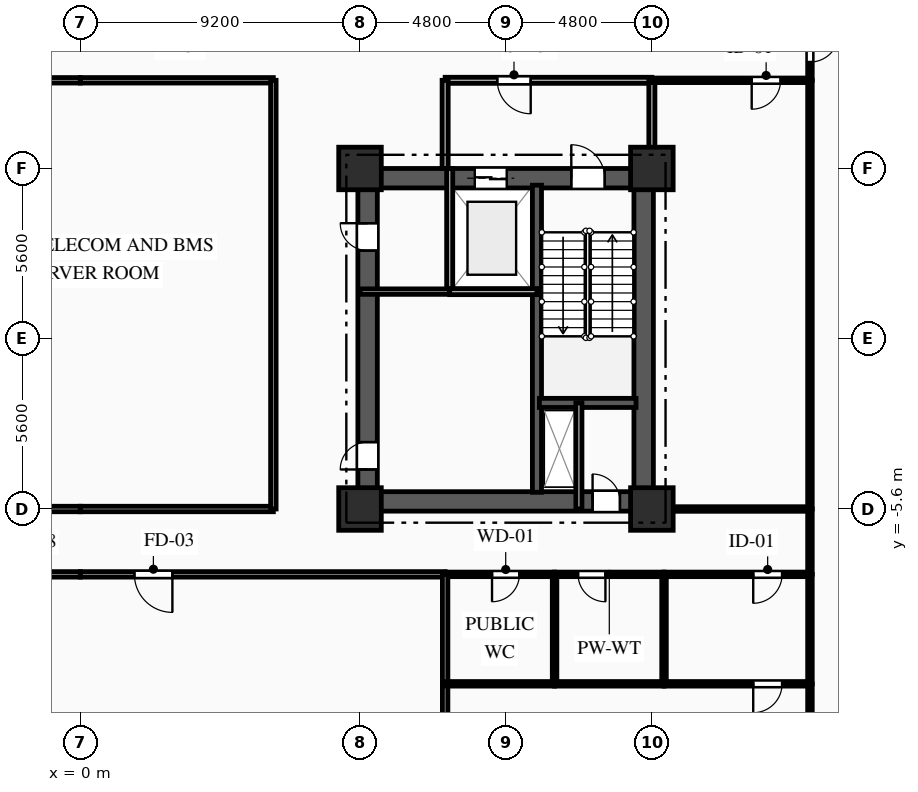
"""IFC4 building model, lengths in metres.
Left out: names, types, materials, properties, quantities, classifications, styles, units other than length and angle.
Written with IfcOpenShell. Run it as: python <this file> out.ifc"""

import sys

from ifc_helpers import new_model, si_unit, direction, frame, frame_2d, origin, origin_2d, place, context, subcontext, project, spatial, rectangle, extrude, element, fill, save


model = new_model("IFC4")
c1 = context("Model", 3, precision=1e-05, world=origin(), true_north=direction((0.0, 1.0)))
c2 = subcontext(c1, "Body", "Model", "MODEL_VIEW")
j1 = project(units=[si_unit("LENGTHUNIT", "METRE"), si_unit("PLANEANGLEUNIT", "RADIAN")], contexts=[c1])
p1 = place(None, origin())
s1 = spatial("IfcSite", under=j1, at=p1, CompositionType="ELEMENT")
p2 = place(p1, origin())
s2 = spatial("IfcBuilding", under=s1, at=p2, CompositionType="ELEMENT")
p3 = place(p2, frame((0.0, 0.0, -4.5)))
s3 = spatial("IfcBuildingStorey", under=s2, at=p3, CompositionType="ELEMENT", Elevation=-4.5)
for number, where, z_axis, x_axis in (
    (1, (9.2, -5.6, 0.0), (0.0, 0.0, 1.0), (1.0, 0.0, 0.0)),
    (2, (9.2, 5.6, 0.0), (0.0, 0.0, 1.0), (1.0, 0.0, 0.0)),
    (3, (18.8, -5.6, 0.0), (0.0, 0.0, 1.0), (1.0, 0.0, 0.0)),
    (4, (18.8, 5.6, 0.0), (0.0, 0.0, 1.0), (1.0, 0.0, 0.0)),
):
    element("IfcColumn", number, at=place(p3, frame(where, z_axis=z_axis, x_axis=x_axis)), inside=s3, PredefinedType="COLUMN", context=c2, shape_type="SweptSolid", body=[
        extrude(rectangle(XDim=1.4, YDim=1.4, at=origin_2d()), origin(), (0.0, 0.0, 1.0), 4.5),
    ])
p4 = place(p3, frame((9.2, 5.28, 0.0), z_axis=(0.0, 0.0, 1.0), x_axis=(1.0, 0.0, 0.0)))
e5 = element("IfcWall", 5, at=p4, inside=s3, PredefinedType="SHEAR", context=c2, shape_type="SweptSolid", body=[
    extrude(rectangle(XDim=9.6, YDim=0.64, at=frame_2d((4.8, 0.0))), origin(), (0.0, 0.0, 1.0), 4.16),
])
p5 = place(p4, frame((6.95, 0.0, 0.0)))
e6 = element("IfcOpeningElement", 6, at=p5, cuts=e5, PredefinedType="OPENING", context=c2, shape_type="SweptSolid", body=[
    extrude(rectangle(XDim=1.1, YDim=2.15, at=frame_2d((0.55, 1.075))), frame((0.0, 0.33, 0.0), z_axis=(0.0, -1.0, 0.0), x_axis=(1.0, 0.0, 0.0)), (0.0, 0.0, 1.0), 0.66),
])
p6 = place(p4, frame((3.775, 0.0, 0.0)))
e7 = element("IfcOpeningElement", 7, at=p6, cuts=e5, PredefinedType="OPENING", context=c2, shape_type="SweptSolid", body=[
    extrude(rectangle(XDim=1.05, YDim=2.1, at=frame_2d((0.525, 1.05))), frame((0.0, 0.33, 0.0), z_axis=(0.0, -1.0, 0.0), x_axis=(1.0, 0.0, 0.0)), (0.0, 0.0, 1.0), 0.66),
])
p7 = place(p3, frame((9.2, -5.35, 0.0), z_axis=(0.0, 0.0, 1.0), x_axis=(1.0, 0.0, 0.0)))
e8 = element("IfcWall", 8, at=p7, inside=s3, PredefinedType="SHEAR", context=c2, shape_type="SweptSolid", body=[
    extrude(rectangle(XDim=9.6, YDim=0.64, at=frame_2d((4.8, 0.0))), origin(), (0.0, 0.0, 1.0), 4.16),
])
p8 = place(p7, frame((7.65, 0.0, 0.0)))
e9 = element("IfcOpeningElement", 9, at=p8, cuts=e8, PredefinedType="OPENING", context=c2, shape_type="SweptSolid", body=[
    extrude(rectangle(XDim=0.9, YDim=2.1, at=frame_2d((0.45, 1.05))), frame((0.0, 0.33, 0.0), z_axis=(0.0, -1.0, 0.0), x_axis=(1.0, 0.0, 0.0)), (0.0, 0.0, 1.0), 0.66),
])
p9 = place(p3, frame((9.45, -5.05, 0.0), z_axis=(0.0, 0.0, 1.0), x_axis=(0.0, 1.0, 0.0)))
e10 = element("IfcWall", 10, at=p9, inside=s3, PredefinedType="SHEAR", context=c2, shape_type="SweptSolid", body=[
    extrude(rectangle(XDim=10.1, YDim=0.64, at=frame_2d((5.05, 0.0))), origin(), (0.0, 0.0, 1.0), 4.16),
])
p10 = place(p9, frame((7.95, 0.0, 0.0)))
e11 = element("IfcOpeningElement", 11, at=p10, cuts=e10, PredefinedType="OPENING", context=c2, shape_type="SweptSolid", body=[
    extrude(rectangle(XDim=0.9, YDim=2.1, at=frame_2d((0.45, 1.05))), frame((0.0, 0.33, 0.0), z_axis=(0.0, -1.0, 0.0), x_axis=(1.0, 0.0, 0.0)), (0.0, 0.0, 1.0), 0.66),
])
p11 = place(p9, frame((0.75, 0.0, 0.0)))
e12 = element("IfcOpeningElement", 12, at=p11, cuts=e10, PredefinedType="OPENING", context=c2, shape_type="SweptSolid", body=[
    extrude(rectangle(XDim=0.9, YDim=2.1, at=frame_2d((0.45, 1.05))), frame((0.0, 0.33, 0.0), z_axis=(0.0, -1.0, 0.0), x_axis=(1.0, 0.0, 0.0)), (0.0, 0.0, 1.0), 0.66),
])
p12 = place(p3, frame((18.53, -5.05, 0.0), z_axis=(0.0, 0.0, 1.0), x_axis=(0.0, 1.0, 0.0)))
e13 = element("IfcWall", 13, at=p12, inside=s3, PredefinedType="SHEAR", context=c2, shape_type="SweptSolid", body=[
    extrude(rectangle(XDim=10.1, YDim=0.64, at=frame_2d((5.05, 0.0))), origin(), (0.0, 0.0, 1.0), 4.16),
])
p13 = place(p3, frame((15.02, -5.05, 0.0), z_axis=(0.0, 0.0, 1.0), x_axis=(0.0, 1.0, 0.0)))
e14 = element("IfcWall", 14, at=p13, inside=s3, PredefinedType="SHEAR", context=c2, shape_type="SweptSolid", body=[
    extrude(rectangle(XDim=10.1, YDim=0.3, at=frame_2d((5.05, 0.0))), origin(), (0.0, 0.0, 1.0), 4.16),
])
p14 = place(p3, frame((15.1, -2.11, 0.0), z_axis=(0.0, 0.0, 1.0), x_axis=(1.0, 0.0, 0.0)))
e15 = element("IfcWall", 15, at=p14, inside=s3, PredefinedType="SHEAR", context=c2, shape_type="SweptSolid", body=[
    extrude(rectangle(XDim=3.18, YDim=0.3, at=frame_2d((1.59, 0.0))), origin(), (0.0, 0.0, 1.0), 4.16),
])
p15 = place(p3, frame((16.4, -2.11, 0.0), z_axis=(0.0, 0.0, 1.0), x_axis=(0.0, -1.0, 0.0)))
e16 = element("IfcWall", 16, at=p15, inside=s3, PredefinedType="PARTITIONING", context=c2, shape_type="SweptSolid", body=[
    extrude(rectangle(XDim=3.49, YDim=0.2, at=frame_2d((1.745, 0.0))), origin(), (0.0, 0.0, 1.0), 4.16),
])
p16 = place(p3, frame((12.15, 5.6, 0.0), z_axis=(0.0, 0.0, 1.0), x_axis=(0.0, -1.0, 0.0)))
e17 = element("IfcWall", 17, at=p16, inside=s3, PredefinedType="PARTITIONING", context=c2, shape_type="SweptSolid", body=[
    extrude(rectangle(XDim=4.05, YDim=0.2, at=frame_2d((2.025, 0.0))), origin(), (0.0, 0.0, 1.0), 4.16),
])
p17 = place(p3, frame((18.8, 8.5, 0.0), z_axis=(0.0, 0.0, 1.0), x_axis=(-1.0, 0.0, 0.0)))
e18 = element("IfcWall", 18, at=p17, inside=s3, PredefinedType="PARTITIONING", context=c2, shape_type="SweptSolid", body=[
    extrude(rectangle(XDim=6.8, YDim=0.2, at=frame_2d((3.4, 0.0))), origin(), (0.0, 0.0, 1.0), 4.16),
])
p18 = place(p17, frame((3.985, 0.0, 0.0)))
e19 = element("IfcOpeningElement", 19, at=p18, cuts=e18, PredefinedType="OPENING", context=c2, shape_type="SweptSolid", body=[
    extrude(rectangle(XDim=1.1, YDim=2.15, at=frame_2d((0.55, 1.075))), frame((0.0, 0.11, 0.0), z_axis=(0.0, -1.0, 0.0), x_axis=(1.0, 0.0, 0.0)), (0.0, 0.0, 1.0), 0.22),
])
p19 = place(p3, frame((12.0, 8.5, 0.0), z_axis=(0.0, 0.0, 1.0), x_axis=(0.0, -1.0, 0.0)))
e20 = element("IfcWall", 20, at=p19, inside=s3, PredefinedType="PARTITIONING", context=c2, shape_type="SweptSolid", body=[
    extrude(rectangle(XDim=2.9, YDim=0.2, at=frame_2d((1.45, 0.0))), origin(), (0.0, 0.0, 1.0), 4.16),
])
p20 = place(p3, frame((18.8, 5.6, 0.0), z_axis=(0.0, 0.0, 1.0), x_axis=(0.0, 1.0, 0.0)))
e21 = element("IfcWall", 21, at=p20, inside=s3, PredefinedType="PARTITIONING", context=c2, shape_type="SweptSolid", body=[
    extrude(rectangle(XDim=2.9, YDim=0.2, at=frame_2d((1.45, 0.0))), origin(), (0.0, 0.0, 1.0), 3.645),
])
p21 = place(p3, frame((9.2, 1.55, 0.0), z_axis=(0.0, 0.0, 1.0), x_axis=(1.0, 0.0, 0.0)))
e22 = element("IfcWall", 22, at=p21, inside=s3, PredefinedType="PARTITIONING", context=c2, shape_type="SweptSolid", body=[
    extrude(rectangle(XDim=2.95, YDim=0.18, at=frame_2d((1.475, 0.0))), origin(), (0.0, 0.0, 1.0), 4.16),
])
p22 = place(p3, frame((0.0, 8.5, 0.0), z_axis=(0.0, 0.0, 1.0), x_axis=(-1.0, 0.0, 0.0)))
e23 = element("IfcWall", 23, at=p22, inside=s3, PredefinedType="PARTITIONING", context=c2, shape_type="SweptSolid", body=[
    extrude(rectangle(XDim=6.35, YDim=0.18, at=frame_2d((3.175, 0.0))), origin(), (0.0, 0.0, 1.0), 4.16),
])
p23 = place(p3, frame((24.0, 8.5, 0.0), z_axis=(0.0, 0.0, 1.0), x_axis=(-1.0, 0.0, 0.0)))
e24 = element("IfcWall", 24, at=p23, inside=s3, PredefinedType="PARTITIONING", context=c2, shape_type="SweptSolid", body=[
    extrude(rectangle(XDim=5.2, YDim=0.15, at=frame_2d((2.6, 0.0))), origin(), (0.0, 0.0, 1.0), 4.16),
])
p24 = place(p23, frame((0.966, 0.0, 0.0)))
e25 = element("IfcOpeningElement", 25, at=p24, cuts=e24, PredefinedType="OPENING", context=c2, shape_type="SweptSolid", body=[
    extrude(rectangle(XDim=0.95, YDim=2.1, at=frame_2d((0.475, 1.05))), frame((0.0, 0.085, 0.0), z_axis=(0.0, -1.0, 0.0), x_axis=(1.0, 0.0, 0.0)), (0.0, 0.0, 1.0), 0.17),
])
p25 = place(p3, frame((6.35, 8.5, 0.0), z_axis=(0.0, 0.0, 1.0), x_axis=(-1.0, 0.0, 0.0)))
e26 = element("IfcWall", 26, at=p25, inside=s3, PredefinedType="PARTITIONING", context=c2, shape_type="SweptSolid", body=[
    extrude(rectangle(XDim=6.35, YDim=0.18, at=frame_2d((3.175, 0.0))), origin(), (0.0, 0.0, 1.0), 4.16),
])
p26 = place(p3, frame((24.0, 10.65, 0.0), z_axis=(0.0, 0.0, 1.0), x_axis=(0.0, -1.0, 0.0)))
e27 = element("IfcWall", 27, at=p26, inside=s3, PredefinedType="PARTITIONING", context=c2, shape_type="SweptSolid", body=[
    extrude(rectangle(XDim=2.15, YDim=0.15, at=frame_2d((1.075, 0.0))), origin(), (0.0, 0.0, 1.0), 4.16),
])
p27 = place(p26, frame((0.6, 0.0, 0.0)))
e28 = element("IfcOpeningElement", 28, at=p27, cuts=e27, PredefinedType="OPENING", context=c2, shape_type="SweptSolid", body=[
    extrude(rectangle(XDim=0.95, YDim=2.1, at=frame_2d((0.475, 1.05))), frame((0.0, 0.085, 0.0), z_axis=(0.0, -1.0, 0.0), x_axis=(1.0, 0.0, 0.0)), (0.0, 0.0, 1.0), 0.17),
])
p28 = place(p3, frame((0.0, -7.75, 0.0), z_axis=(0.0, 0.0, 1.0), x_axis=(-1.0, 0.0, 0.0)))
e29 = element("IfcWall", 29, at=p28, inside=s3, PredefinedType="PARTITIONING", context=c2, shape_type="SweptSolid", body=[
    extrude(rectangle(XDim=3.36, YDim=0.18, at=frame_2d((1.68, 0.0))), origin(), (0.0, 0.0, 1.0), 4.16),
])
p29 = place(p3, frame((-6.35, -5.6, 0.0), z_axis=(0.0, 0.0, 1.0), x_axis=(1.0, 0.0, 0.0)))
e30 = element("IfcWall", 30, at=p29, inside=s3, PredefinedType="PARTITIONING", context=c2, shape_type="SweptSolid", body=[
    extrude(rectangle(XDim=6.35, YDim=0.18, at=frame_2d((3.175, 0.0))), origin(), (0.0, 0.0, 1.0), 3.331),
])
p30 = place(p3, frame((12.0, -7.75, 0.0), z_axis=(0.0, 0.0, 1.0), x_axis=(-1.0, 0.0, 0.0)))
e31 = element("IfcWall", 31, at=p30, inside=s3, PredefinedType="PARTITIONING", context=c2, shape_type="SweptSolid", body=[
    extrude(rectangle(XDim=12.0, YDim=0.18, at=frame_2d((6.0, 0.0))), origin(), (0.0, 0.0, 1.0), 4.16),
])
p31 = place(p30, frame((8.971, 0.0, 0.0)))
e32 = element("IfcOpeningElement", 32, at=p31, cuts=e31, PredefinedType="OPENING", context=c2, shape_type="SweptSolid", body=[
    extrude(rectangle(XDim=1.25, YDim=2.2, at=frame_2d((0.625, 1.1))), frame((0.0, 0.1, 0.0), z_axis=(0.0, -1.0, 0.0), x_axis=(1.0, 0.0, 0.0)), (0.0, 0.0, 1.0), 0.2),
])
p32 = place(p3, frame((18.8, -5.6, 0.0), z_axis=(0.0, 0.0, 1.0), x_axis=(1.0, 0.0, 0.0)))
e33 = element("IfcWall", 33, at=p32, inside=s3, PredefinedType="PARTITIONING", context=c2, shape_type="SweptSolid", body=[
    extrude(rectangle(XDim=5.2, YDim=0.15, at=frame_2d((2.6, 0.0))), origin(), (0.0, 0.0, 1.0), 4.16),
])
p33 = place(p3, frame((0.0, -5.6, 0.0), z_axis=(0.0, 0.0, 1.0), x_axis=(1.0, 0.0, 0.0)))
e34 = element("IfcWall", 34, at=p33, inside=s3, PredefinedType="PARTITIONING", context=c2, shape_type="SweptSolid", body=[
    extrude(rectangle(XDim=6.35, YDim=0.18, at=frame_2d((3.175, 0.0))), origin(), (0.0, 0.0, 1.0), 3.331),
])
p34 = place(p3, frame((24.0, -5.6, 0.0), z_axis=(0.0, 0.0, 1.0), x_axis=(0.0, -1.0, 0.0)))
e35 = element("IfcWall", 35, at=p34, inside=s3, PredefinedType="PARTITIONING", context=c2, shape_type="SweptSolid", body=[
    extrude(rectangle(XDim=2.15, YDim=0.15, at=frame_2d((1.075, 0.0))), origin(), (0.0, 0.0, 1.0), 4.16),
])
p35 = place(p3, frame((15.6, -7.75, 0.0), z_axis=(0.0, 0.0, 1.0), x_axis=(-1.0, 0.0, 0.0)))
e36 = element("IfcWall", 36, at=p35, inside=s3, PredefinedType="PLUMBINGWALL", context=c2, shape_type="SweptSolid", body=[
    extrude(rectangle(XDim=3.6, YDim=0.15, at=frame_2d((1.8, 0.0))), origin(), (0.0, 0.0, 1.0), 4.16),
])
p36 = place(p35, frame((1.157, 0.0, 0.0)))
e37 = element("IfcOpeningElement", 37, at=p36, cuts=e36, PredefinedType="OPENING", context=c2, shape_type="SweptSolid", body=[
    extrude(rectangle(XDim=0.9, YDim=2.1, at=frame_2d((0.45, 1.05))), frame((0.0, 0.085, 0.0), z_axis=(0.0, -1.0, 0.0), x_axis=(1.0, 0.0, 0.0)), (0.0, 0.0, 1.0), 0.17),
])
p37 = place(p3, frame((19.2, -7.75, 0.0), z_axis=(0.0, 0.0, 1.0), x_axis=(-1.0, 0.0, 0.0)))
e38 = element("IfcWall", 38, at=p37, inside=s3, PredefinedType="PLUMBINGWALL", context=c2, shape_type="SweptSolid", body=[
    extrude(rectangle(XDim=3.6, YDim=0.15, at=frame_2d((1.8, 0.0))), origin(), (0.0, 0.0, 1.0), 4.16),
])
p38 = place(p37, frame((1.927, 0.0, 0.0)))
e39 = element("IfcOpeningElement", 39, at=p38, cuts=e38, PredefinedType="OPENING", context=c2, shape_type="SweptSolid", body=[
    extrude(rectangle(XDim=0.9, YDim=2.1, at=frame_2d((0.45, 1.05))), frame((0.0, 0.085, 0.0), z_axis=(0.0, -1.0, 0.0), x_axis=(1.0, 0.0, 0.0)), (0.0, 0.0, 1.0), 0.17),
])
p39 = place(p3, frame((24.0, -7.75, 0.0), z_axis=(0.0, 0.0, 1.0), x_axis=(-1.0, 0.0, 0.0)))
e40 = element("IfcWall", 40, at=p39, inside=s3, PredefinedType="PARTITIONING", context=c2, shape_type="SweptSolid", body=[
    extrude(rectangle(XDim=4.8, YDim=0.15, at=frame_2d((2.4, 0.0))), origin(), (0.0, 0.0, 1.0), 4.16),
])
p40 = place(p39, frame((0.916, 0.0, 0.0)))
e41 = element("IfcOpeningElement", 41, at=p40, cuts=e40, PredefinedType="OPENING", context=c2, shape_type="SweptSolid", body=[
    extrude(rectangle(XDim=0.95, YDim=2.1, at=frame_2d((0.475, 1.05))), frame((0.0, 0.085, 0.0), z_axis=(0.0, -1.0, 0.0), x_axis=(1.0, 0.0, 0.0)), (0.0, 0.0, 1.0), 0.17),
])
p41 = place(p3, frame((6.35, -5.6, 0.0), z_axis=(0.0, 0.0, 1.0), x_axis=(0.0, 1.0, 0.0)))
e42 = element("IfcWall", 42, at=p41, inside=s3, PredefinedType="PARTITIONING", context=c2, shape_type="SweptSolid", body=[
    extrude(rectangle(XDim=14.1, YDim=0.18, at=frame_2d((7.05, 0.0))), origin(), (0.0, 0.0, 1.0), 4.16),
])
p42 = place(p3, frame((12.0, -7.75, 0.0), z_axis=(0.0, 0.0, 1.0), x_axis=(0.0, -1.0, 0.0)))
e43 = element("IfcWall", 43, at=p42, inside=s3, PredefinedType="PARTITIONING", context=c2, shape_type="SweptSolid", body=[
    extrude(rectangle(XDim=3.6, YDim=0.18, at=frame_2d((1.8, 0.0))), origin(), (0.0, 0.0, 1.0), 4.16),
])
p43 = place(p3, frame((12.0, -11.35, 0.0), z_axis=(0.0, 0.0, 1.0), x_axis=(0.0, -1.0, 0.0)))
e44 = element("IfcWall", 44, at=p43, inside=s3, PredefinedType="PARTITIONING", context=c2, shape_type="SweptSolid", body=[
    extrude(rectangle(XDim=3.47, YDim=0.18, at=frame_2d((1.735, 0.0))), origin(), (0.0, 0.0, 1.0), 4.16),
])
p44 = place(p3, frame((24.0, 8.5, 0.0), z_axis=(0.0, 0.0, 1.0), x_axis=(0.0, -1.0, 0.0)))
e45 = element("IfcWall", 45, at=p44, inside=s3, PredefinedType="PARTITIONING", context=c2, shape_type="SweptSolid", body=[
    extrude(rectangle(XDim=14.1, YDim=0.15, at=frame_2d((7.05, 0.0))), origin(), (0.0, 0.0, 1.0), 4.16),
])
p45 = place(p3, frame((24.0, -11.35, 0.0), z_axis=(0.0, 0.0, 1.0), x_axis=(0.0, 1.0, 0.0)))
e46 = element("IfcWall", 46, at=p45, inside=s3, PredefinedType="PARTITIONING", context=c2, shape_type="SweptSolid", body=[
    extrude(rectangle(XDim=3.6, YDim=0.15, at=frame_2d((1.8, 0.0))), origin(), (0.0, 0.0, 1.0), 4.16),
])
p46 = place(p3, frame((24.0, -24.8, 0.0), z_axis=(0.0, 0.0, 1.0), x_axis=(0.0, 1.0, 0.0)))
e47 = element("IfcWall", 47, at=p46, inside=s3, PredefinedType="PARTITIONING", context=c2, shape_type="SweptSolid", body=[
    extrude(rectangle(XDim=13.45, YDim=0.15, at=frame_2d((6.725, 0.0))), origin(), (0.0, 0.0, 1.0), 4.16),
])
for number, where, z_axis, x_axis in (
    (48, (15.6, -7.75, 0.0), (0.0, 0.0, 1.0), (0.0, -1.0, 0.0)),
    (49, (15.6, -11.35, 0.0), (0.0, 0.0, 1.0), (-1.0, 0.0, 0.0)),
    (50, (19.2, -7.75, 0.0), (0.0, 0.0, 1.0), (0.0, -1.0, 0.0)),
):
    element("IfcWall", number, at=place(p3, frame(where, z_axis=z_axis, x_axis=x_axis)), inside=s3, PredefinedType="PLUMBINGWALL", context=c2, shape_type="SweptSolid", body=[
        extrude(rectangle(XDim=3.6, YDim=0.15, at=frame_2d((1.8, 0.0))), origin(), (0.0, 0.0, 1.0), 4.16),
    ])
p47 = place(p3, frame((19.2, -11.35, 0.0), z_axis=(0.0, 0.0, 1.0), x_axis=(-1.0, 0.0, 0.0)))
e51 = element("IfcWall", 51, at=p47, inside=s3, PredefinedType="PLUMBINGWALL", context=c2, shape_type="SweptSolid", body=[
    extrude(rectangle(XDim=3.6, YDim=0.15, at=frame_2d((1.8, 0.0))), origin(), (0.0, 0.0, 1.0), 4.16),
])
p48 = place(p3, frame((24.0, -11.35, 0.0), z_axis=(0.0, 0.0, 1.0), x_axis=(-1.0, 0.0, 0.0)))
e52 = element("IfcWall", 52, at=p48, inside=s3, PredefinedType="PARTITIONING", context=c2, shape_type="SweptSolid", body=[
    extrude(rectangle(XDim=4.8, YDim=0.15, at=frame_2d((2.4, 0.0))), origin(), (0.0, 0.0, 1.0), 4.16),
])
p49 = place(p48, frame((0.916, 0.0, 0.0)))
e53 = element("IfcOpeningElement", 53, at=p49, cuts=e52, PredefinedType="OPENING", context=c2, shape_type="SweptSolid", body=[
    extrude(rectangle(XDim=0.95, YDim=2.1, at=frame_2d((0.475, 1.05))), frame((0.0, 0.085, 0.0), z_axis=(0.0, -1.0, 0.0), x_axis=(1.0, 0.0, 0.0)), (0.0, 0.0, 1.0), 0.17),
])
p50 = place(p3, frame((12.15, 1.55, 0.0), z_axis=(0.0, 0.0, 1.0), x_axis=(1.0, 0.0, 0.0)))
e54 = element("IfcWall", 54, at=p50, inside=s3, PredefinedType="PARTITIONING", context=c2, shape_type="SweptSolid", body=[
    extrude(rectangle(XDim=2.87, YDim=0.2, at=frame_2d((1.435, 0.0))), origin(), (0.0, 0.0, 1.0), 4.16),
])
p51 = place(p5, origin())
e55 = element("IfcDoor", 55, at=p51, inside=s3, OperationType="SINGLE_SWING_LEFT", PredefinedType="DOOR", context=c2, shape_type="SweptSolid", body=[
    extrude(rectangle(XDim=1.1, YDim=2.15, at=frame_2d((0.55, 1.075))), frame((0.0, 0.025, 0.0), z_axis=(0.0, -1.0, 0.0), x_axis=(1.0, 0.0, 0.0)), (0.0, 0.0, 1.0), 0.05),
])
fill(e6, e55)
p52 = place(p6, origin())
e56 = element("IfcDoor", 56, at=p52, inside=s3, OperationType="DOUBLE_DOOR_SLIDING", PredefinedType="DOOR", context=c2, shape_type="SweptSolid", body=[
    extrude(rectangle(XDim=1.05, YDim=2.1, at=frame_2d((0.525, 1.05))), frame((0.0, 0.025, 0.0), z_axis=(0.0, -1.0, 0.0), x_axis=(1.0, 0.0, 0.0)), (0.0, 0.0, 1.0), 0.05),
])
fill(e7, e56)
p53 = place(p8, origin())
e57 = element("IfcDoor", 57, at=p53, inside=s3, OperationType="SINGLE_SWING_LEFT", PredefinedType="DOOR", context=c2, shape_type="SweptSolid", body=[
    extrude(rectangle(XDim=0.9, YDim=2.1, at=frame_2d((0.45, 1.05))), frame((0.0, 0.025, 0.0), z_axis=(0.0, -1.0, 0.0), x_axis=(1.0, 0.0, 0.0)), (0.0, 0.0, 1.0), 0.05),
])
fill(e9, e57)
p54 = place(p18, origin())
e58 = element("IfcDoor", 58, at=p54, inside=s3, OperationType="SINGLE_SWING_LEFT", PredefinedType="DOOR", context=c2, shape_type="SweptSolid", body=[
    extrude(rectangle(XDim=1.1, YDim=2.15, at=frame_2d((0.55, 1.075))), frame((0.0, 0.025, 0.0), z_axis=(0.0, -1.0, 0.0), x_axis=(1.0, 0.0, 0.0)), (0.0, 0.0, 1.0), 0.05),
])
fill(e19, e58)
p55 = place(p10, origin())
e59 = element("IfcDoor", 59, at=p55, inside=s3, OperationType="SINGLE_SWING_RIGHT", PredefinedType="DOOR", context=c2, shape_type="SweptSolid", body=[
    extrude(rectangle(XDim=0.9, YDim=2.1, at=frame_2d((0.45, 1.05))), frame((0.0, 0.025, 0.0), z_axis=(0.0, -1.0, 0.0), x_axis=(1.0, 0.0, 0.0)), (0.0, 0.0, 1.0), 0.05),
])
fill(e11, e59)
p56 = place(p11, origin())
e60 = element("IfcDoor", 60, at=p56, inside=s3, OperationType="SINGLE_SWING_LEFT", PredefinedType="DOOR", context=c2, shape_type="SweptSolid", body=[
    extrude(rectangle(XDim=0.9, YDim=2.1, at=frame_2d((0.45, 1.05))), frame((0.0, 0.025, 0.0), z_axis=(0.0, -1.0, 0.0), x_axis=(1.0, 0.0, 0.0)), (0.0, 0.0, 1.0), 0.05),
])
fill(e12, e60)
p57 = place(p24, origin())
e61 = element("IfcDoor", 61, at=p57, inside=s3, OperationType="SINGLE_SWING_RIGHT", PredefinedType="DOOR", context=c2, shape_type="SweptSolid", body=[
    extrude(rectangle(XDim=0.95, YDim=2.1, at=frame_2d((0.475, 1.05))), frame((0.0, 0.025, 0.0), z_axis=(0.0, -1.0, 0.0), x_axis=(1.0, 0.0, 0.0)), (0.0, 0.0, 1.0), 0.05),
])
fill(e25, e61)
p58 = place(p27, origin())
e62 = element("IfcDoor", 62, at=p58, inside=s3, OperationType="SINGLE_SWING_LEFT", PredefinedType="DOOR", context=c2, shape_type="SweptSolid", body=[
    extrude(rectangle(XDim=0.95, YDim=2.1, at=frame_2d((0.475, 1.05))), frame((0.0, 0.025, 0.0), z_axis=(0.0, -1.0, 0.0), x_axis=(1.0, 0.0, 0.0)), (0.0, 0.0, 1.0), 0.05),
])
fill(e28, e62)
p59 = place(p31, origin())
e63 = element("IfcDoor", 63, at=p59, inside=s3, OperationType="SINGLE_SWING_LEFT", PredefinedType="DOOR", context=c2, shape_type="SweptSolid", body=[
    extrude(rectangle(XDim=1.25, YDim=2.2, at=frame_2d((0.625, 1.1))), frame((0.0, 0.025, 0.0), z_axis=(0.0, -1.0, 0.0), x_axis=(1.0, 0.0, 0.0)), (0.0, 0.0, 1.0), 0.05),
])
fill(e32, e63)
p60 = place(p36, origin())
e64 = element("IfcDoor", 64, at=p60, inside=s3, OperationType="SINGLE_SWING_RIGHT", PredefinedType="DOOR", context=c2, shape_type="SweptSolid", body=[
    extrude(rectangle(XDim=0.9, YDim=2.1, at=frame_2d((0.45, 1.05))), frame((0.0, 0.025, 0.0), z_axis=(0.0, -1.0, 0.0), x_axis=(1.0, 0.0, 0.0)), (0.0, 0.0, 1.0), 0.05),
])
fill(e37, e64)
p61 = place(p38, origin())
e65 = element("IfcDoor", 65, at=p61, inside=s3, OperationType="SINGLE_SWING_LEFT", PredefinedType="DOOR", context=c2, shape_type="SweptSolid", body=[
    extrude(rectangle(XDim=0.9, YDim=2.1, at=frame_2d((0.45, 1.05))), frame((0.0, 0.025, 0.0), z_axis=(0.0, -1.0, 0.0), x_axis=(1.0, 0.0, 0.0)), (0.0, 0.0, 1.0), 0.05),
])
fill(e39, e65)
p62 = place(p40, origin())
e66 = element("IfcDoor", 66, at=p62, inside=s3, OperationType="SINGLE_SWING_RIGHT", PredefinedType="DOOR", context=c2, shape_type="SweptSolid", body=[
    extrude(rectangle(XDim=0.95, YDim=2.1, at=frame_2d((0.475, 1.05))), frame((0.0, 0.025, 0.0), z_axis=(0.0, -1.0, 0.0), x_axis=(1.0, 0.0, 0.0)), (0.0, 0.0, 1.0), 0.05),
])
fill(e41, e66)
p63 = place(p49, origin())
e67 = element("IfcDoor", 67, at=p63, inside=s3, OperationType="SINGLE_SWING_RIGHT", PredefinedType="DOOR", context=c2, shape_type="SweptSolid", body=[
    extrude(rectangle(XDim=0.95, YDim=2.1, at=frame_2d((0.475, 1.05))), frame((0.0, 0.025, 0.0), z_axis=(0.0, -1.0, 0.0), x_axis=(1.0, 0.0, 0.0)), (0.0, 0.0, 1.0), 0.05),
])
fill(e53, e67)
save(model, sys.argv[1])
